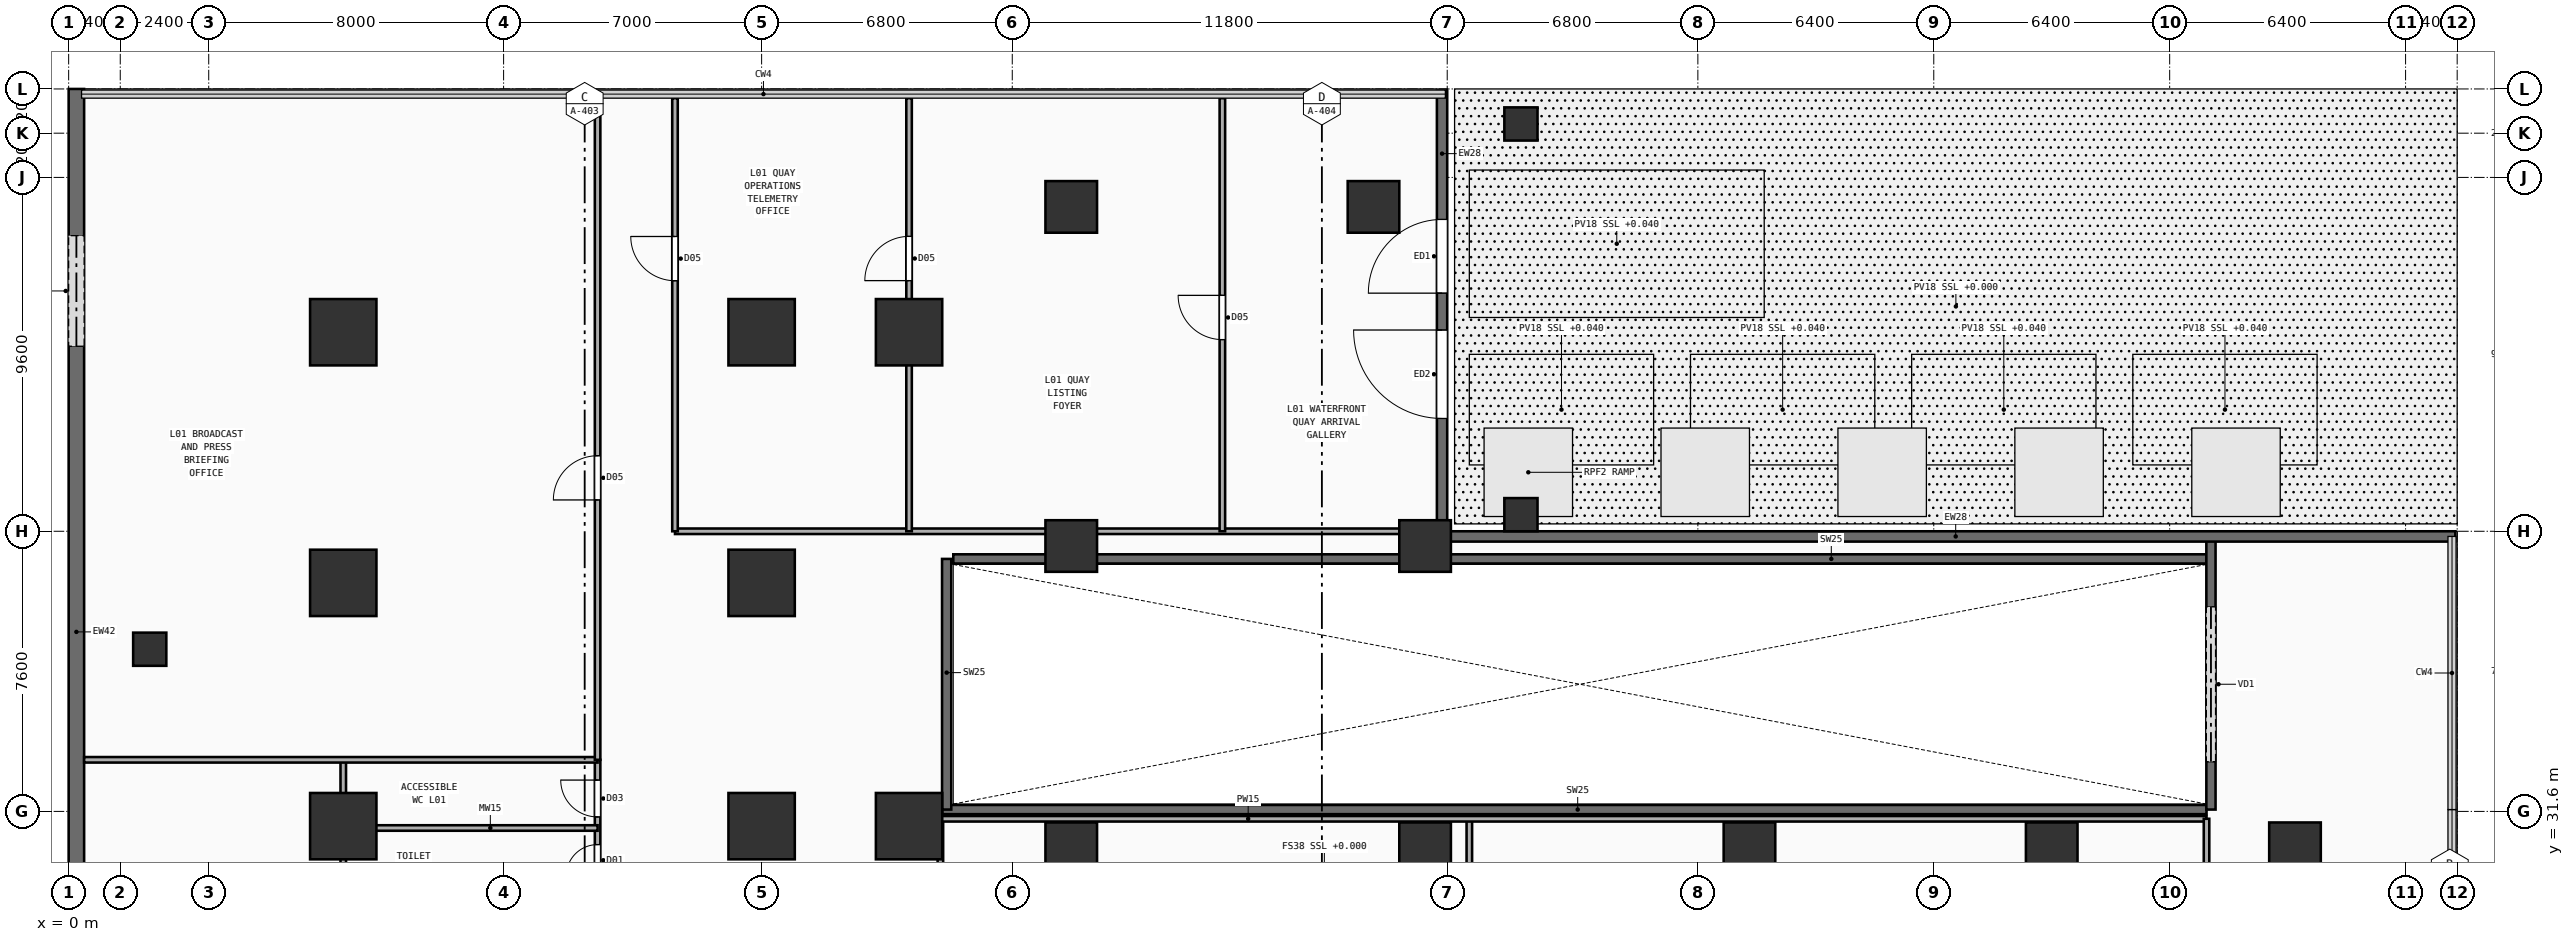
"""IFC4 building model, lengths in metres.
Left out: names, types, materials, properties, quantities, classifications, styles, units other than length and angle.
Written with IfcOpenShell. Run it as: python <this file> out.ifc"""

import sys

from ifc_helpers import new_model, si_unit, direction, frame, frame_2d, origin, origin_2d, place, context, subcontext, project, spatial, rectangle, extrude, element, fill, save


model = new_model("IFC4")
c1 = context("Model", 3, precision=1e-05, world=origin(), true_north=direction((0.0, 1.0)))
c2 = subcontext(c1, "Body", "Model", "MODEL_VIEW")
j1 = project(units=[si_unit("LENGTHUNIT", "METRE"), si_unit("PLANEANGLEUNIT", "RADIAN")], contexts=[c1])
p1 = place(None, origin())
s1 = spatial("IfcSite", under=j1, at=p1, CompositionType="ELEMENT")
p2 = place(p1, origin())
s2 = spatial("IfcBuilding", under=s1, at=p2, CompositionType="ELEMENT")
p3 = place(p2, origin())
s3 = spatial("IfcBuildingStorey", under=s2, at=p3, CompositionType="ELEMENT", Elevation=0.0)
p4 = place(p3, frame((23.7, 31.65, 0.0), z_axis=(0.0, 0.0, 1.0), x_axis=(1.0, 0.0, 0.0)))
e1 = element("IfcWall", 1, at=p4, inside=s3, PredefinedType="SOLIDWALL", context=c2, shape_type="SweptSolid", body=[
    extrude(rectangle(XDim=34.3, YDim=0.25, at=frame_2d((17.15, 0.0))), origin(), (0.0, 0.0, 1.0), 5.26),
])
p5 = place(p3, frame((24.0, 38.45, 0.0), z_axis=(0.0, 0.0, 1.0), x_axis=(1.0, 0.0, 0.0)))
e2 = element("IfcWall", 2, at=p5, inside=s3, PredefinedType="SOLIDWALL", context=c2, shape_type="SweptSolid", body=[
    extrude(rectangle(XDim=34.0, YDim=0.25, at=frame_2d((17.0, 0.0))), origin(), (0.0, 0.0, 1.0), 5.26),
])
p6 = place(p3, frame((23.82, 31.65, 0.0), z_axis=(0.0, 0.0, 1.0), x_axis=(0.0, 1.0, 0.0)))
e3 = element("IfcWall", 3, at=p6, inside=s3, PredefinedType="SOLIDWALL", context=c2, shape_type="SweptSolid", body=[
    extrude(rectangle(XDim=6.8, YDim=0.25, at=frame_2d((3.4, 0.0))), origin(), (0.0, 0.0, 1.0), 5.26),
])
p7 = place(p3, frame((58.12, 31.65, 0.0), z_axis=(0.0, 0.0, 1.0), x_axis=(0.0, 1.0, 0.0)))
e4 = element("IfcWall", 4, at=p7, inside=s3, PredefinedType="SOLIDWALL", context=c2, shape_type="SweptSolid", body=[
    extrude(rectangle(XDim=7.41, YDim=0.25, at=frame_2d((3.705, 0.0))), origin(), (0.0, 0.0, 1.0), 5.26),
])
p8 = place(p7, frame((1.3, 0.0, 0.0)))
e5 = element("IfcOpeningElement", 5, at=p8, cuts=e4, PredefinedType="OPENING", context=c2, shape_type="SweptSolid", body=[
    extrude(rectangle(XDim=4.2, YDim=3.2, at=frame_2d((2.1, 1.6))), frame((0.0, 0.135, 0.0), z_axis=(0.0, -1.0, 0.0), x_axis=(1.0, 0.0, 0.0)), (0.0, 0.0, 1.0), 0.27),
])
for number, where, z_axis, x_axis in (
    (6, (39.4, 39.65, 0.0), (0.0, 0.0, 1.0), (1.0, 0.0, 0.0)),
    (7, (39.4, 50.25, 0.0), (0.0, 0.0, 1.0), (1.0, 0.0, 0.0)),
):
    element("IfcColumn", number, at=place(p3, frame(where, z_axis=z_axis, x_axis=x_axis)), inside=s3, PredefinedType="COLUMN", context=c2, shape_type="SweptSolid", body=[
        extrude(rectangle(XDim=0.9, YDim=0.9, at=origin_2d()), origin(), (0.0, 0.0, 1.0), 5.39),
    ])
for number, where, z_axis, x_axis in (
    (8, (7.45, 31.2, 0.0), (0.0, 0.0, 1.0), (1.0, 0.0, 0.0)),
    (9, (7.45, 37.8, 0.0), (0.0, 0.0, 1.0), (1.0, 0.0, 0.0)),
    (10, (7.45, 44.6, 0.0), (0.0, 0.0, 1.0), (1.0, 0.0, 0.0)),
    (11, (18.8, 31.2, 0.0), (0.0, 0.0, 1.0), (1.0, 0.0, 0.0)),
    (12, (18.8, 37.8, 0.0), (0.0, 0.0, 1.0), (1.0, 0.0, 0.0)),
    (13, (18.8, 44.6, 0.0), (0.0, 0.0, 1.0), (1.0, 0.0, 0.0)),
    (14, (22.8, 31.2, 0.0), (0.0, 0.0, 1.0), (1.0, 0.0, 0.0)),
    (15, (22.8, 44.6, 0.0), (0.0, 0.0, 1.0), (1.0, 0.0, 0.0)),
):
    element("IfcColumn", number, at=place(p3, frame(where, z_axis=z_axis, x_axis=x_axis)), inside=s3, PredefinedType="COLUMN", context=c2, shape_type="SweptSolid", body=[
        extrude(rectangle(XDim=1.8, YDim=1.8, at=origin_2d()), origin(), (0.0, 0.0, 1.0), 5.26),
    ])
for number, where, z_axis, x_axis in (
    (16, (27.2, 30.6, 0.0), (0.0, 0.0, 1.0), (1.0, 0.0, 0.0)),
    (17, (36.8, 30.6, 0.0), (0.0, 0.0, 1.0), (1.0, 0.0, 0.0)),
    (18, (45.6, 30.6, 0.0), (0.0, 0.0, 1.0), (1.0, 0.0, 0.0)),
    (19, (53.8, 30.6, 0.0), (0.0, 0.0, 1.0), (1.0, 0.0, 0.0)),
    (20, (60.4, 30.6, 0.0), (0.0, 0.0, 1.0), (1.0, 0.0, 0.0)),
    (21, (27.2, 38.8, 0.0), (0.0, 0.0, 1.0), (1.0, 0.0, 0.0)),
    (22, (36.8, 38.8, 0.0), (0.0, 0.0, 1.0), (1.0, 0.0, 0.0)),
    (23, (27.2, 48.0, 0.0), (0.0, 0.0, 1.0), (1.0, 0.0, 0.0)),
    (24, (35.4, 48.0, 0.0), (0.0, 0.0, 1.0), (1.0, 0.0, 0.0)),
):
    element("IfcColumn", number, at=place(p3, frame(where, z_axis=z_axis, x_axis=x_axis)), inside=s3, PredefinedType="COLUMN", context=c2, shape_type="SweptSolid", body=[
        extrude(rectangle(XDim=1.4, YDim=1.4, at=origin_2d()), origin(), (0.0, 0.0, 1.0), 5.26),
    ])
p9 = place(p3, frame((2.2, 36.0, 0.0), z_axis=(0.0, 0.0, 1.0), x_axis=(1.0, 0.0, 0.0)))
e25 = element("IfcColumn", 25, at=p9, inside=s3, PredefinedType="PILASTER", context=c2, shape_type="SweptSolid", body=[
    extrude(rectangle(XDim=0.9, YDim=0.9, at=origin_2d()), origin(), (0.0, 0.0, 1.0), 5.26),
])
p10 = place(p3, frame((0.21, 0.42, 0.0), z_axis=(0.0, 0.0, 1.0), x_axis=(0.0, 1.0, 0.0)))
e26 = element("IfcWall", 26, at=p10, inside=s3, PredefinedType="SOLIDWALL", context=c2, shape_type="SweptSolid", body=[
    extrude(rectangle(XDim=50.78, YDim=0.42, at=frame_2d((25.39, 0.0))), origin(), (0.0, 0.0, 1.0), 5.26),
])
p11 = place(p10, frame((18.0, 0.0, 0.95)))
e27 = element("IfcOpeningElement", 27, at=p11, cuts=e26, PredefinedType="OPENING", context=c2, shape_type="SweptSolid", body=[
    extrude(rectangle(XDim=1.2, YDim=1.6, at=frame_2d((0.6, 0.8))), frame((0.0, 0.22, 0.0), z_axis=(0.0, -1.0, 0.0), x_axis=(1.0, 0.0, 0.0)), (0.0, 0.0, 1.0), 0.44),
])
p12 = place(p10, frame((27.5, 0.0, 0.95)))
e28 = element("IfcOpeningElement", 28, at=p12, cuts=e26, PredefinedType="OPENING", context=c2, shape_type="SweptSolid", body=[
    extrude(rectangle(XDim=1.2, YDim=1.6, at=frame_2d((0.6, 0.8))), frame((0.0, 0.22, 0.0), z_axis=(0.0, -1.0, 0.0), x_axis=(1.0, 0.0, 0.0)), (0.0, 0.0, 1.0), 0.44),
])
p13 = place(p10, frame((8.0, 0.0, 0.0)))
e29 = element("IfcOpeningElement", 29, at=p13, cuts=e26, PredefinedType="OPENING", context=c2, shape_type="SweptSolid", body=[
    extrude(rectangle(XDim=2.0, YDim=2.5, at=frame_2d((1.0, 1.25))), frame((0.0, 0.22, 0.0), z_axis=(0.0, -1.0, 0.0), x_axis=(1.0, 0.0, 0.0)), (0.0, 0.0, 1.0), 0.44),
])
p14 = place(p10, frame((43.8, 0.0, 0.0)))
e30 = element("IfcOpeningElement", 30, at=p14, cuts=e26, PredefinedType="OPENING", context=c2, shape_type="SweptSolid", body=[
    extrude(rectangle(XDim=3.0, YDim=2.8, at=frame_2d((1.5, 1.4))), frame((0.0, 0.22, 0.0), z_axis=(0.0, -1.0, 0.0), x_axis=(1.0, 0.0, 0.0)), (0.0, 0.0, 1.0), 0.44),
])
p15 = place(p3, frame((37.26, 39.06, 0.0), z_axis=(0.0, 0.0, 1.0), x_axis=(0.0, 1.0, 0.0)))
e31 = element("IfcWall", 31, at=p15, inside=s3, PredefinedType="SOLIDWALL", context=c2, shape_type="SweptSolid", body=[
    extrude(rectangle(XDim=12.09, YDim=0.28, at=frame_2d((6.045, 0.0))), origin(), (0.0, 0.0, 1.0), 5.26),
])
p16 = place(p15, frame((3.2, 0.0, 0.0)))
e32 = element("IfcOpeningElement", 32, at=p16, cuts=e31, PredefinedType="OPENING", context=c2, shape_type="SweptSolid", body=[
    extrude(rectangle(XDim=2.4, YDim=2.7, at=frame_2d((1.2, 1.35))), frame((0.0, 0.15, 0.0), z_axis=(0.0, -1.0, 0.0), x_axis=(1.0, 0.0, 0.0)), (0.0, 0.0, 1.0), 0.3),
])
p17 = place(p15, frame((6.6, 0.0, 0.0)))
e33 = element("IfcOpeningElement", 33, at=p17, cuts=e31, PredefinedType="OPENING", context=c2, shape_type="SweptSolid", body=[
    extrude(rectangle(XDim=2.0, YDim=2.5, at=frame_2d((1.0, 1.25))), frame((0.0, 0.15, 0.0), z_axis=(0.0, -1.0, 0.0), x_axis=(1.0, 0.0, 0.0)), (0.0, 0.0, 1.0), 0.3),
])
p18 = place(p3, frame((37.12, 39.06, 0.0), z_axis=(0.0, 0.0, 1.0), x_axis=(1.0, 0.0, 0.0)))
e34 = element("IfcWall", 34, at=p18, inside=s3, PredefinedType="SOLIDWALL", context=c2, shape_type="SweptSolid", body=[
    extrude(rectangle(XDim=27.63, YDim=0.28, at=frame_2d((13.815, 0.0))), origin(), (0.0, 0.0, 1.0), 5.26),
])
p19 = place(p3, frame((7.45, 27.35, 0.0), z_axis=(0.0, 0.0, 1.0), x_axis=(0.0, 1.0, 0.0)))
e35 = element("IfcWall", 35, at=p19, inside=s3, PredefinedType="PLUMBINGWALL", context=c2, shape_type="SweptSolid", body=[
    extrude(rectangle(XDim=5.65, YDim=0.15, at=frame_2d((2.825, 0.0))), origin(), (0.0, 0.0, 1.0), 4.9),
])
p20 = place(p3, frame((14.35, 27.35, 0.0), z_axis=(0.0, 0.0, 1.0), x_axis=(0.0, 1.0, 0.0)))
e36 = element("IfcWall", 36, at=p20, inside=s3, PredefinedType="PLUMBINGWALL", context=c2, shape_type="SweptSolid", body=[
    extrude(rectangle(XDim=5.65, YDim=0.15, at=frame_2d((2.825, 0.0))), origin(), (0.0, 0.0, 1.0), 5.26),
])
p21 = place(p20, frame((0.6, 0.0, 0.0)))
e37 = element("IfcOpeningElement", 37, at=p21, cuts=e36, PredefinedType="OPENING", context=c2, shape_type="SweptSolid", body=[
    extrude(rectangle(XDim=0.85, YDim=2.15, at=frame_2d((0.425, 1.075))), frame((0.0, 0.085, 0.0), z_axis=(0.0, -1.0, 0.0), x_axis=(1.0, 0.0, 0.0)), (0.0, 0.0, 1.0), 0.17),
])
p22 = place(p20, frame((2.5, 0.0, 0.0)))
e38 = element("IfcOpeningElement", 38, at=p22, cuts=e36, PredefinedType="OPENING", context=c2, shape_type="SweptSolid", body=[
    extrude(rectangle(XDim=0.85, YDim=2.15, at=frame_2d((0.425, 1.075))), frame((0.0, 0.085, 0.0), z_axis=(0.0, -1.0, 0.0), x_axis=(1.0, 0.0, 0.0)), (0.0, 0.0, 1.0), 0.17),
])
p23 = place(p20, frame((4.1, 0.0, 0.0)))
e39 = element("IfcOpeningElement", 39, at=p23, cuts=e36, PredefinedType="OPENING", context=c2, shape_type="SweptSolid", body=[
    extrude(rectangle(XDim=1.0, YDim=2.2, at=frame_2d((0.5, 1.1))), frame((0.0, 0.085, 0.0), z_axis=(0.0, -1.0, 0.0), x_axis=(1.0, 0.0, 0.0)), (0.0, 0.0, 1.0), 0.17),
])
p24 = place(p3, frame((7.45, 31.15, 0.0), z_axis=(0.0, 0.0, 1.0), x_axis=(1.0, 0.0, 0.0)))
e40 = element("IfcWall", 40, at=p24, inside=s3, PredefinedType="PLUMBINGWALL", context=c2, shape_type="SweptSolid", body=[
    extrude(rectangle(XDim=6.9, YDim=0.15, at=frame_2d((3.45, 0.0))), origin(), (0.0, 0.0, 1.0), 4.66),
])
p25 = place(p3, frame((0.42, 33.0, 0.0), z_axis=(0.0, 0.0, 1.0), x_axis=(1.0, 0.0, 0.0)))
e41 = element("IfcWall", 41, at=p25, inside=s3, PredefinedType="PLUMBINGWALL", context=c2, shape_type="SweptSolid", body=[
    extrude(rectangle(XDim=13.93, YDim=0.15, at=frame_2d((6.965, 0.0))), origin(), (0.0, 0.0, 1.0), 5.26),
])
for number, where, z_axis, x_axis in (
    (42, (23.65, 16.35, 0.0), (0.0, 0.0, 1.0), (0.0, 1.0, 0.0)),
    (43, (38.0, 16.35, 0.0), (0.0, 0.0, 1.0), (0.0, 1.0, 0.0)),
):
    element("IfcWall", number, at=place(p3, frame(where, z_axis=z_axis, x_axis=x_axis)), inside=s3, PredefinedType="PARTITIONING", context=c2, shape_type="SweptSolid", body=[
        extrude(rectangle(XDim=15.05, YDim=0.15, at=frame_2d((7.525, 0.0))), origin(), (0.0, 0.0, 1.0), 5.26),
    ])
p26 = place(p3, frame((23.65, 31.4, 0.0), z_axis=(0.0, 0.0, 1.0), x_axis=(1.0, 0.0, 0.0)))
e44 = element("IfcWall", 44, at=p26, inside=s3, PredefinedType="PARTITIONING", context=c2, shape_type="SweptSolid", body=[
    extrude(rectangle(XDim=34.35, YDim=0.15, at=frame_2d((17.175, 0.0))), origin(), (0.0, 0.0, 1.0), 5.26),
])
p27 = place(p3, frame((58.0, 16.35, 0.0), z_axis=(0.0, 0.0, 1.0), x_axis=(0.0, 1.0, 0.0)))
e45 = element("IfcWall", 45, at=p27, inside=s3, PredefinedType="PARTITIONING", context=c2, shape_type="SweptSolid", body=[
    extrude(rectangle(XDim=15.05, YDim=0.15, at=frame_2d((7.525, 0.0))), origin(), (0.0, 0.0, 1.0), 5.26),
])
p28 = place(p3, frame((14.35, 33.0, 0.0), z_axis=(0.0, 0.0, 1.0), x_axis=(0.0, 1.0, 0.0)))
e46 = element("IfcWall", 46, at=p28, inside=s3, PredefinedType="PARTITIONING", context=c2, shape_type="SweptSolid", body=[
    extrude(rectangle(XDim=17.95, YDim=0.15, at=frame_2d((8.975, 0.0))), origin(), (0.0, 0.0, 1.0), 5.26),
])
p29 = place(p28, frame((7.05, 0.0, 0.0)))
e47 = element("IfcOpeningElement", 47, at=p29, cuts=e46, PredefinedType="OPENING", context=c2, shape_type="SweptSolid", body=[
    extrude(rectangle(XDim=1.2, YDim=2.25, at=frame_2d((0.6, 1.125))), frame((0.0, 0.085, 0.0), z_axis=(0.0, -1.0, 0.0), x_axis=(1.0, 0.0, 0.0)), (0.0, 0.0, 1.0), 0.17),
])
p30 = place(p3, frame((16.45, 39.2, 0.0), z_axis=(0.0, 0.0, 1.0), x_axis=(1.0, 0.0, 0.0)))
e48 = element("IfcWall", 48, at=p30, inside=s3, PredefinedType="PARTITIONING", context=c2, shape_type="SweptSolid", body=[
    extrude(rectangle(XDim=20.81, YDim=0.15, at=frame_2d((10.405, 0.0))), origin(), (0.0, 0.0, 1.0), 5.26),
])
p31 = place(p3, frame((16.45, 39.2, 0.0), z_axis=(0.0, 0.0, 1.0), x_axis=(0.0, 1.0, 0.0)))
e49 = element("IfcWall", 49, at=p31, inside=s3, PredefinedType="PARTITIONING", context=c2, shape_type="SweptSolid", body=[
    extrude(rectangle(XDim=11.75, YDim=0.15, at=frame_2d((5.875, 0.0))), origin(), (0.0, 0.0, 1.0), 5.26),
])
p32 = place(p31, frame((6.797, 0.0, 0.0)))
e50 = element("IfcOpeningElement", 50, at=p32, cuts=e49, PredefinedType="OPENING", context=c2, shape_type="SweptSolid", body=[
    extrude(rectangle(XDim=1.2, YDim=2.25, at=frame_2d((0.6, 1.125))), frame((0.0, 0.085, 0.0), z_axis=(0.0, -1.0, 0.0), x_axis=(1.0, 0.0, 0.0)), (0.0, 0.0, 1.0), 0.17),
])
p33 = place(p3, frame((22.8, 39.2, 0.0), z_axis=(0.0, 0.0, 1.0), x_axis=(0.0, 1.0, 0.0)))
e51 = element("IfcWall", 51, at=p33, inside=s3, PredefinedType="PARTITIONING", context=c2, shape_type="SweptSolid", body=[
    extrude(rectangle(XDim=11.75, YDim=0.15, at=frame_2d((5.875, 0.0))), origin(), (0.0, 0.0, 1.0), 5.26),
])
p34 = place(p33, frame((6.8, 0.0, 0.0)))
e52 = element("IfcOpeningElement", 52, at=p34, cuts=e51, PredefinedType="OPENING", context=c2, shape_type="SweptSolid", body=[
    extrude(rectangle(XDim=1.2, YDim=2.25, at=frame_2d((0.6, 1.125))), frame((0.0, 0.085, 0.0), z_axis=(0.0, -1.0, 0.0), x_axis=(1.0, 0.0, 0.0)), (0.0, 0.0, 1.0), 0.17),
])
p35 = place(p3, frame((31.3, 39.2, 0.0), z_axis=(0.0, 0.0, 1.0), x_axis=(0.0, 1.0, 0.0)))
e53 = element("IfcWall", 53, at=p35, inside=s3, PredefinedType="PARTITIONING", context=c2, shape_type="SweptSolid", body=[
    extrude(rectangle(XDim=11.75, YDim=0.15, at=frame_2d((5.875, 0.0))), origin(), (0.0, 0.0, 1.0), 5.26),
])
p36 = place(p35, frame((5.2, 0.0, 0.0)))
e54 = element("IfcOpeningElement", 54, at=p36, cuts=e53, PredefinedType="OPENING", context=c2, shape_type="SweptSolid", body=[
    extrude(rectangle(XDim=1.2, YDim=2.25, at=frame_2d((0.6, 1.125))), frame((0.0, 0.085, 0.0), z_axis=(0.0, -1.0, 0.0), x_axis=(1.0, 0.0, 0.0)), (0.0, 0.0, 1.0), 0.17),
])
p37 = place(p16, frame((2.4, 0.0, 0.0), z_axis=(0.0, 0.0, 1.0), x_axis=(-1.0, 0.0, 0.0)))
e55 = element("IfcDoor", 55, at=p37, inside=s3, OperationType="SINGLE_SWING_LEFT", PredefinedType="DOOR", context=c2, shape_type="SweptSolid", body=[
    extrude(rectangle(XDim=2.4, YDim=2.7, at=frame_2d((1.2, 1.35))), frame((0.0, 0.025, 0.0), z_axis=(0.0, -1.0, 0.0), x_axis=(1.0, 0.0, 0.0)), (0.0, 0.0, 1.0), 0.05),
])
fill(e32, e55)
p38 = place(p17, frame((2.0, 0.0, 0.0), z_axis=(0.0, 0.0, 1.0), x_axis=(-1.0, 0.0, 0.0)))
e56 = element("IfcDoor", 56, at=p38, inside=s3, OperationType="SINGLE_SWING_RIGHT", PredefinedType="DOOR", context=c2, shape_type="SweptSolid", body=[
    extrude(rectangle(XDim=2.0, YDim=2.5, at=frame_2d((1.0, 1.25))), frame((0.0, 0.025, 0.0), z_axis=(0.0, -1.0, 0.0), x_axis=(1.0, 0.0, 0.0)), (0.0, 0.0, 1.0), 0.05),
])
fill(e33, e56)
p39 = place(p8, origin())
e57 = element("IfcDoor", 57, at=p39, inside=s3, OperationType="ROLLINGUP", PredefinedType="GATE", context=c2, shape_type="SweptSolid", body=[
    extrude(rectangle(XDim=4.2, YDim=3.2, at=frame_2d((2.1, 1.6))), frame((0.0, 0.025, 0.0), z_axis=(0.0, -1.0, 0.0), x_axis=(1.0, 0.0, 0.0)), (0.0, 0.0, 1.0), 0.05),
])
fill(e5, e57)
p40 = place(p14, frame((3.0, 0.0, 0.0), z_axis=(0.0, 0.0, 1.0), x_axis=(-1.0, 0.0, 0.0)))
e58 = element("IfcDoor", 58, at=p40, inside=s3, OperationType="ROLLINGUP", PredefinedType="GATE", context=c2, shape_type="SweptSolid", body=[
    extrude(rectangle(XDim=3.0, YDim=2.8, at=frame_2d((1.5, 1.4))), frame((0.0, 0.025, 0.0), z_axis=(0.0, -1.0, 0.0), x_axis=(1.0, 0.0, 0.0)), (0.0, 0.0, 1.0), 0.05),
])
fill(e30, e58)
p41 = place(p22, origin())
e59 = element("IfcDoor", 59, at=p41, inside=s3, OperationType="SINGLE_SWING_LEFT", PredefinedType="DOOR", context=c2, shape_type="SweptSolid", body=[
    extrude(rectangle(XDim=0.85, YDim=2.15, at=frame_2d((0.425, 1.075))), frame((0.0, 0.025, 0.0), z_axis=(0.0, -1.0, 0.0), x_axis=(1.0, 0.0, 0.0)), (0.0, 0.0, 1.0), 0.05),
])
fill(e38, e59)
p42 = place(p23, origin())
e60 = element("IfcDoor", 60, at=p42, inside=s3, OperationType="SINGLE_SWING_RIGHT", PredefinedType="DOOR", context=c2, shape_type="SweptSolid", body=[
    extrude(rectangle(XDim=1.0, YDim=2.2, at=frame_2d((0.5, 1.1))), frame((0.0, 0.025, 0.0), z_axis=(0.0, -1.0, 0.0), x_axis=(1.0, 0.0, 0.0)), (0.0, 0.0, 1.0), 0.05),
])
fill(e39, e60)
p43 = place(p29, origin())
e61 = element("IfcDoor", 61, at=p43, inside=s3, OperationType="SINGLE_SWING_LEFT", PredefinedType="DOOR", context=c2, shape_type="SweptSolid", body=[
    extrude(rectangle(XDim=1.2, YDim=2.25, at=frame_2d((0.6, 1.125))), frame((0.0, 0.025, 0.0), z_axis=(0.0, -1.0, 0.0), x_axis=(1.0, 0.0, 0.0)), (0.0, 0.0, 1.0), 0.05),
])
fill(e47, e61)
p44 = place(p32, origin())
e62 = element("IfcDoor", 62, at=p44, inside=s3, OperationType="SINGLE_SWING_RIGHT", PredefinedType="DOOR", context=c2, shape_type="SweptSolid", body=[
    extrude(rectangle(XDim=1.2, YDim=2.25, at=frame_2d((0.6, 1.125))), frame((0.0, 0.025, 0.0), z_axis=(0.0, -1.0, 0.0), x_axis=(1.0, 0.0, 0.0)), (0.0, 0.0, 1.0), 0.05),
])
fill(e50, e62)
p45 = place(p34, origin())
e63 = element("IfcDoor", 63, at=p45, inside=s3, OperationType="SINGLE_SWING_LEFT", PredefinedType="DOOR", context=c2, shape_type="SweptSolid", body=[
    extrude(rectangle(XDim=1.2, YDim=2.25, at=frame_2d((0.6, 1.125))), frame((0.0, 0.025, 0.0), z_axis=(0.0, -1.0, 0.0), x_axis=(1.0, 0.0, 0.0)), (0.0, 0.0, 1.0), 0.05),
])
fill(e52, e63)
p46 = place(p36, origin())
e64 = element("IfcDoor", 64, at=p46, inside=s3, OperationType="SINGLE_SWING_RIGHT", PredefinedType="DOOR", context=c2, shape_type="SweptSolid", body=[
    extrude(rectangle(XDim=1.2, YDim=2.25, at=frame_2d((0.6, 1.125))), frame((0.0, 0.025, 0.0), z_axis=(0.0, -1.0, 0.0), x_axis=(1.0, 0.0, 0.0)), (0.0, 0.0, 1.0), 0.05),
])
fill(e54, e64)
save(model, sys.argv[1])
